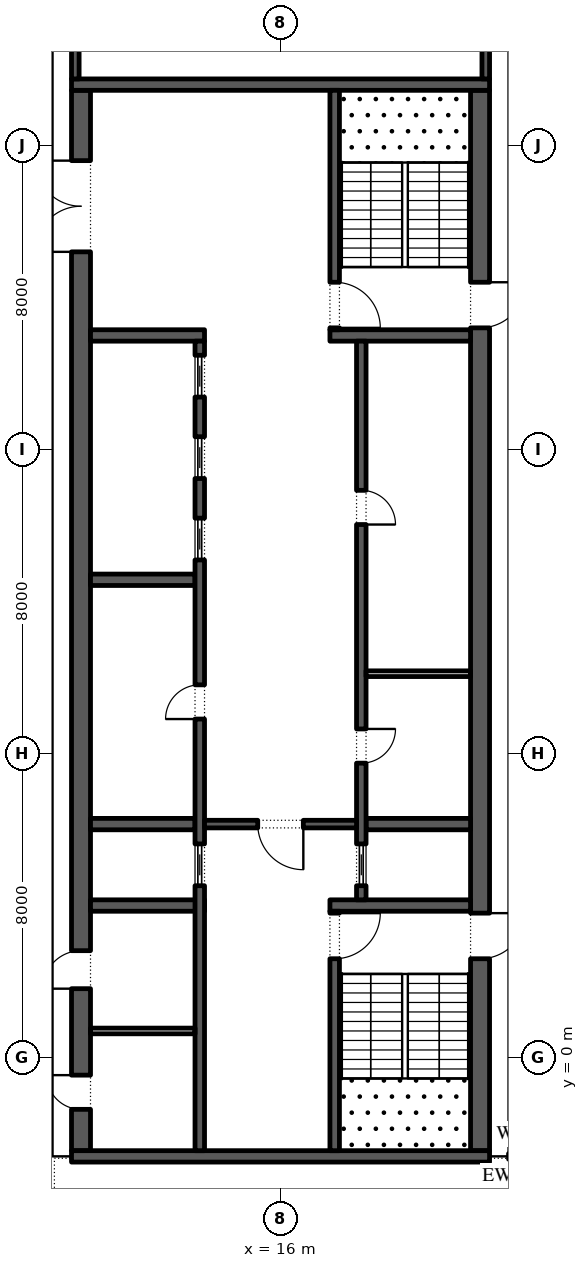
"""IFC4 building model, lengths in metres.
Left out: names, types, materials, properties, quantities, classifications, styles, units other than length and angle.
Written with IfcOpenShell. Run it as: python <this file> out.ifc"""

import sys

from ifc_helpers import new_model, si_unit, direction, frame, frame_2d, origin, place, context, subcontext, project, spatial, rectangle, extrude, element, fill, save


model = new_model("IFC4")
c1 = context("Model", 3, precision=1e-05, world=origin(), true_north=direction((0.0, 1.0)))
c2 = subcontext(c1, "Body", "Model", "MODEL_VIEW")
j1 = project(units=[si_unit("LENGTHUNIT", "METRE"), si_unit("PLANEANGLEUNIT", "RADIAN")], contexts=[c1])
p1 = place(None, origin())
s1 = spatial("IfcSite", under=j1, at=p1, CompositionType="ELEMENT")
p2 = place(p1, origin())
s2 = spatial("IfcBuilding", under=s1, at=p2, CompositionType="ELEMENT")
p3 = place(p2, frame((0.0, 0.0, 355.2)))
s3 = spatial("IfcBuildingStorey", under=s2, at=p3, CompositionType="ELEMENT", Elevation=355.2)
p4 = place(p3, frame((21.25, -2.45, 0.0), z_axis=(0.0, 0.0, 1.0), x_axis=(0.0, 1.0, 0.0)))
e1 = element("IfcWall", 1, at=p4, inside=s3, PredefinedType="SHEAR", context=c2, shape_type="SweptSolid", body=[
    extrude(rectangle(XDim=27.9, YDim=0.5, at=frame_2d((13.95, 0.0))), origin(), (0.0, 0.0, 1.0), 3.95),
])
p5 = place(p4, frame((5.05, 0.0, 0.0)))
e2 = element("IfcOpeningElement", 2, at=p5, cuts=e1, PredefinedType="OPENING", context=c2, shape_type="SweptSolid", body=[
    extrude(rectangle(XDim=1.2, YDim=2.1, at=frame_2d((0.6, 1.05))), frame((0.0, 0.26, 0.0), z_axis=(0.0, -1.0, 0.0), x_axis=(1.0, 0.0, 0.0)), (0.0, 0.0, 1.0), 0.52),
])
p6 = place(p4, frame((21.65, 0.0, 0.0)))
e3 = element("IfcOpeningElement", 3, at=p6, cuts=e1, PredefinedType="OPENING", context=c2, shape_type="SweptSolid", body=[
    extrude(rectangle(XDim=1.2, YDim=2.1, at=frame_2d((0.6, 1.05))), frame((0.0, 0.26, 0.0), z_axis=(0.0, -1.0, 0.0), x_axis=(1.0, 0.0, 0.0)), (0.0, 0.0, 1.0), 0.52),
])
p7 = place(p3, frame((10.75, -2.45, 0.0), z_axis=(0.0, 0.0, 1.0), x_axis=(0.0, 1.0, 0.0)))
e4 = element("IfcWall", 4, at=p7, inside=s3, PredefinedType="SHEAR", context=c2, shape_type="SweptSolid", body=[
    extrude(rectangle(XDim=27.9, YDim=0.5, at=frame_2d((13.95, 0.0))), origin(), (0.0, 0.0, 1.0), 3.95),
])
p8 = place(p7, frame((23.65, 0.0, 0.0)))
e5 = element("IfcOpeningElement", 5, at=p8, cuts=e4, PredefinedType="OPENING", context=c2, shape_type="SweptSolid", body=[
    extrude(rectangle(XDim=2.4, YDim=2.1, at=frame_2d((1.2, 1.05))), frame((0.0, 0.26, 0.0), z_axis=(0.0, -1.0, 0.0), x_axis=(1.0, 0.0, 0.0)), (0.0, 0.0, 1.0), 0.52),
])
p9 = place(p7, frame((1.087, 0.0, 0.0)))
e6 = element("IfcOpeningElement", 6, at=p9, cuts=e4, PredefinedType="OPENING", context=c2, shape_type="SweptSolid", body=[
    extrude(rectangle(XDim=0.9, YDim=2.1, at=frame_2d((0.45, 1.05))), frame((0.0, 0.26, 0.0), z_axis=(0.0, -1.0, 0.0), x_axis=(1.0, 0.0, 0.0)), (0.0, 0.0, 1.0), 0.52),
])
p10 = place(p7, frame((4.262, 0.0, 0.0)))
e7 = element("IfcOpeningElement", 7, at=p10, cuts=e4, PredefinedType="OPENING", context=c2, shape_type="SweptSolid", body=[
    extrude(rectangle(XDim=1.0, YDim=2.1, at=frame_2d((0.5, 1.05))), frame((0.0, 0.26, 0.0), z_axis=(0.0, -1.0, 0.0), x_axis=(1.0, 0.0, 0.0)), (0.0, 0.0, 1.0), 0.52),
])
for number, where, z_axis, x_axis in (
    (8, (10.5, -2.6, 0.0), (0.0, 0.0, 1.0), (1.0, 0.0, 0.0)),
    (9, (10.5, 25.6, 0.0), (0.0, 0.0, 1.0), (1.0, 0.0, 0.0)),
):
    element("IfcWall", number, at=place(p3, frame(where, z_axis=z_axis, x_axis=x_axis)), inside=s3, PredefinedType="SHEAR", context=c2, shape_type="SweptSolid", body=[
        extrude(rectangle(XDim=11.0, YDim=0.3, at=frame_2d((5.5, 0.0))), origin(), (0.0, 0.0, 1.0), 3.95),
    ])
p11 = place(p3, frame((17.3, 4.0, 0.0), z_axis=(0.0, 0.0, 1.0), x_axis=(1.0, 0.0, 0.0)))
e10 = element("IfcWall", 10, at=p11, inside=s3, PredefinedType="SHEAR", context=c2, shape_type="SweptSolid", body=[
    extrude(rectangle(XDim=3.7, YDim=0.3, at=frame_2d((1.85, 0.0))), origin(), (0.0, 0.0, 1.0), 3.95),
])
p12 = place(p3, frame((17.425, -2.45, 0.0), z_axis=(0.0, 0.0, 1.0), x_axis=(0.0, 1.0, 0.0)))
e11 = element("IfcWall", 11, at=p12, inside=s3, PredefinedType="SHEAR", context=c2, shape_type="SweptSolid", body=[
    extrude(rectangle(XDim=6.3, YDim=0.25, at=frame_2d((3.15, 0.0))), origin(), (0.0, 0.0, 1.0), 3.95),
])
p13 = place(p12, frame((5.05, 0.0, 0.0)))
e12 = element("IfcOpeningElement", 12, at=p13, cuts=e11, PredefinedType="OPENING", context=c2, shape_type="SweptSolid", body=[
    extrude(rectangle(XDim=1.2, YDim=2.1, at=frame_2d((0.6, 1.05))), frame((0.0, 0.135, 0.0), z_axis=(0.0, -1.0, 0.0), x_axis=(1.0, 0.0, 0.0)), (0.0, 0.0, 1.0), 0.27),
])
p14 = place(p3, frame((17.3, 19.0, 0.0), z_axis=(0.0, 0.0, 1.0), x_axis=(1.0, 0.0, 0.0)))
e13 = element("IfcWall", 13, at=p14, inside=s3, PredefinedType="SHEAR", context=c2, shape_type="SweptSolid", body=[
    extrude(rectangle(XDim=3.7, YDim=0.3, at=frame_2d((1.85, 0.0))), origin(), (0.0, 0.0, 1.0), 3.95),
])
p15 = place(p3, frame((17.425, 19.15, 0.0), z_axis=(0.0, 0.0, 1.0), x_axis=(0.0, 1.0, 0.0)))
e14 = element("IfcWall", 14, at=p15, inside=s3, PredefinedType="SHEAR", context=c2, shape_type="SweptSolid", body=[
    extrude(rectangle(XDim=6.3, YDim=0.25, at=frame_2d((3.15, 0.0))), origin(), (0.0, 0.0, 1.0), 3.95),
])
p16 = place(p15, frame((0.05, 0.0, 0.0)))
e15 = element("IfcOpeningElement", 15, at=p16, cuts=e14, PredefinedType="OPENING", context=c2, shape_type="SweptSolid", body=[
    extrude(rectangle(XDim=1.2, YDim=2.1, at=frame_2d((0.6, 1.05))), frame((0.0, 0.135, 0.0), z_axis=(0.0, -1.0, 0.0), x_axis=(1.0, 0.0, 0.0)), (0.0, 0.0, 1.0), 0.27),
])
p17 = place(p3, frame((18.25, 6.143, 0.0), z_axis=(0.0, 0.0, 1.0), x_axis=(1.0, 0.0, 0.0)))
e16 = element("IfcWall", 16, at=p17, inside=s3, PredefinedType="SHEAR", context=c2, shape_type="SweptSolid", body=[
    extrude(rectangle(XDim=2.75, YDim=0.3, at=frame_2d((1.375, 0.0))), origin(), (0.0, 0.0, 1.0), 3.95),
])
p18 = place(p3, frame((18.125, 4.15, 0.0), z_axis=(0.0, 0.0, 1.0), x_axis=(0.0, 1.0, 0.0)))
e17 = element("IfcWall", 17, at=p18, inside=s3, PredefinedType="SHEAR", context=c2, shape_type="SweptSolid", body=[
    extrude(rectangle(XDim=14.7, YDim=0.25, at=frame_2d((7.35, 0.0))), origin(), (0.0, 0.0, 1.0), 3.95),
])
p19 = place(p18, frame((3.596, 0.0, 0.0)))
e18 = element("IfcOpeningElement", 18, at=p19, cuts=e17, PredefinedType="OPENING", context=c2, shape_type="SweptSolid", body=[
    extrude(rectangle(XDim=0.9, YDim=2.1, at=frame_2d((0.45, 1.05))), frame((0.0, 0.135, 0.0), z_axis=(0.0, -1.0, 0.0), x_axis=(1.0, 0.0, 0.0)), (0.0, 0.0, 1.0), 0.27),
])
p20 = place(p18, frame((9.875, 0.0, 0.0)))
e19 = element("IfcOpeningElement", 19, at=p20, cuts=e17, PredefinedType="OPENING", context=c2, shape_type="SweptSolid", body=[
    extrude(rectangle(XDim=0.9, YDim=2.1, at=frame_2d((0.45, 1.05))), frame((0.0, 0.135, 0.0), z_axis=(0.0, -1.0, 0.0), x_axis=(1.0, 0.0, 0.0)), (0.0, 0.0, 1.0), 0.27),
])
p21 = place(p18, frame((0.371, 0.0, 0.0)))
e20 = element("IfcOpeningElement", 20, at=p21, cuts=e17, PredefinedType="OPENING", context=c2, shape_type="SweptSolid", body=[
    extrude(rectangle(XDim=1.1, YDim=2.1, at=frame_2d((0.55, 1.05))), frame((0.0, 0.135, 0.0), z_axis=(0.0, -1.0, 0.0), x_axis=(1.0, 0.0, 0.0)), (0.0, 0.0, 1.0), 0.27),
])
p22 = place(p3, frame((18.25, 10.1, 0.0), z_axis=(0.0, 0.0, 1.0), x_axis=(1.0, 0.0, 0.0)))
e21 = element("IfcWall", 21, at=p22, inside=s3, PredefinedType="PARTITIONING", context=c2, shape_type="SweptSolid", body=[
    extrude(rectangle(XDim=2.75, YDim=0.15, at=frame_2d((1.375, 0.0))), origin(), (0.0, 0.0, 1.0), 3.95),
])
p23 = place(p3, frame((11.0, 4.0, 0.0), z_axis=(0.0, 0.0, 1.0), x_axis=(1.0, 0.0, 0.0)))
e22 = element("IfcWall", 22, at=p23, inside=s3, PredefinedType="SHEAR", context=c2, shape_type="SweptSolid", body=[
    extrude(rectangle(XDim=3.0, YDim=0.3, at=frame_2d((1.5, 0.0))), origin(), (0.0, 0.0, 1.0), 3.95),
])
for number, where, z_axis, x_axis in (
    (23, (11.0, 6.143, 0.0), (0.0, 0.0, 1.0), (1.0, 0.0, 0.0)),
    (24, (11.0, 12.571, 0.0), (0.0, 0.0, 1.0), (1.0, 0.0, 0.0)),
):
    element("IfcWall", number, at=place(p3, frame(where, z_axis=z_axis, x_axis=x_axis)), inside=s3, PredefinedType="SHEAR", context=c2, shape_type="SweptSolid", body=[
        extrude(rectangle(XDim=2.75, YDim=0.3, at=frame_2d((1.375, 0.0))), origin(), (0.0, 0.0, 1.0), 3.95),
    ])
p24 = place(p3, frame((11.0, 19.0, 0.0), z_axis=(0.0, 0.0, 1.0), x_axis=(1.0, 0.0, 0.0)))
e25 = element("IfcWall", 25, at=p24, inside=s3, PredefinedType="SHEAR", context=c2, shape_type="SweptSolid", body=[
    extrude(rectangle(XDim=3.0, YDim=0.3, at=frame_2d((1.5, 0.0))), origin(), (0.0, 0.0, 1.0), 3.95),
])
p25 = place(p3, frame((13.875, -2.45, 0.0), z_axis=(0.0, 0.0, 1.0), x_axis=(0.0, 1.0, 0.0)))
e26 = element("IfcWall", 26, at=p25, inside=s3, PredefinedType="SHEAR", context=c2, shape_type="SweptSolid", body=[
    extrude(rectangle(XDim=21.3, YDim=0.25, at=frame_2d((10.65, 0.0))), origin(), (0.0, 0.0, 1.0), 3.95),
])
p26 = place(p25, frame((11.357, 0.0, 0.0)))
e27 = element("IfcOpeningElement", 27, at=p26, cuts=e26, PredefinedType="OPENING", context=c2, shape_type="SweptSolid", body=[
    extrude(rectangle(XDim=0.9, YDim=2.1, at=frame_2d((0.45, 1.05))), frame((0.0, 0.135, 0.0), z_axis=(0.0, -1.0, 0.0), x_axis=(1.0, 0.0, 0.0)), (0.0, 0.0, 1.0), 0.27),
])
p27 = place(p25, frame((6.971, 0.0, 0.0)))
e28 = element("IfcOpeningElement", 28, at=p27, cuts=e26, PredefinedType="OPENING", context=c2, shape_type="SweptSolid", body=[
    extrude(rectangle(XDim=1.1, YDim=2.1, at=frame_2d((0.55, 1.05))), frame((0.0, 0.135, 0.0), z_axis=(0.0, -1.0, 0.0), x_axis=(1.0, 0.0, 0.0)), (0.0, 0.0, 1.0), 0.27),
])
p28 = place(p25, frame((15.543, 0.0, 0.0)))
e29 = element("IfcOpeningElement", 29, at=p28, cuts=e26, PredefinedType="OPENING", context=c2, shape_type="SweptSolid", body=[
    extrude(rectangle(XDim=1.1, YDim=2.1, at=frame_2d((0.55, 1.05))), frame((0.0, 0.135, 0.0), z_axis=(0.0, -1.0, 0.0), x_axis=(1.0, 0.0, 0.0)), (0.0, 0.0, 1.0), 0.27),
])
p29 = place(p25, frame((17.686, 0.0, 0.0)))
e30 = element("IfcOpeningElement", 30, at=p29, cuts=e26, PredefinedType="OPENING", context=c2, shape_type="SweptSolid", body=[
    extrude(rectangle(XDim=1.1, YDim=2.1, at=frame_2d((0.55, 1.05))), frame((0.0, 0.135, 0.0), z_axis=(0.0, -1.0, 0.0), x_axis=(1.0, 0.0, 0.0)), (0.0, 0.0, 1.0), 0.27),
])
p30 = place(p25, frame((19.829, 0.0, 0.0)))
e31 = element("IfcOpeningElement", 31, at=p30, cuts=e26, PredefinedType="OPENING", context=c2, shape_type="SweptSolid", body=[
    extrude(rectangle(XDim=1.1, YDim=2.1, at=frame_2d((0.55, 1.05))), frame((0.0, 0.135, 0.0), z_axis=(0.0, -1.0, 0.0), x_axis=(1.0, 0.0, 0.0)), (0.0, 0.0, 1.0), 0.27),
])
p31 = place(p3, frame((14.0, 6.143, 0.0), z_axis=(0.0, 0.0, 1.0), x_axis=(1.0, 0.0, 0.0)))
e32 = element("IfcWall", 32, at=p31, inside=s3, PredefinedType="SHEAR", context=c2, shape_type="SweptSolid", body=[
    extrude(rectangle(XDim=4.0, YDim=0.2, at=frame_2d((2.0, 0.0))), origin(), (0.0, 0.0, 1.0), 3.95),
])
p32 = place(p31, frame((1.4, 0.0, 0.0)))
e33 = element("IfcOpeningElement", 33, at=p32, cuts=e32, PredefinedType="OPENING", context=c2, shape_type="SweptSolid", body=[
    extrude(rectangle(XDim=1.2, YDim=2.1, at=frame_2d((0.6, 1.05))), frame((0.0, 0.11, 0.0), z_axis=(0.0, -1.0, 0.0), x_axis=(1.0, 0.0, 0.0)), (0.0, 0.0, 1.0), 0.22),
])
p33 = place(p3, frame((11.0, 0.7, 0.0), z_axis=(0.0, 0.0, 1.0), x_axis=(1.0, 0.0, 0.0)))
e34 = element("IfcWall", 34, at=p33, inside=s3, PredefinedType="PARTITIONING", context=c2, shape_type="SweptSolid", body=[
    extrude(rectangle(XDim=2.75, YDim=0.15, at=frame_2d((1.375, 0.0))), origin(), (0.0, 0.0, 1.0), 3.95),
])
p34 = place(p3, frame((21.4, 25.75, 0.0), z_axis=(0.0, 0.0, 1.0), x_axis=(0.0, 1.0, 0.0)))
e35 = element("IfcWall", 35, at=p34, inside=s3, PredefinedType="SHEAR", context=c2, shape_type="SweptSolid", body=[
    extrude(rectangle(XDim=15.05, YDim=0.2, at=frame_2d((7.525, 0.0))), origin(), (0.0, 0.0, 1.0), 3.95),
])
p35 = place(p3, frame((10.6, 25.75, 0.0), z_axis=(0.0, 0.0, 1.0), x_axis=(0.0, 1.0, 0.0)))
e36 = element("IfcWall", 36, at=p35, inside=s3, PredefinedType="SHEAR", context=c2, shape_type="SweptSolid", body=[
    extrude(rectangle(XDim=15.05, YDim=0.2, at=frame_2d((7.525, 0.0))), origin(), (0.0, 0.0, 1.0), 3.95),
])
p36 = place(p35, frame((3.288, 0.0, 0.0)))
e37 = element("IfcOpeningElement", 37, at=p36, cuts=e36, PredefinedType="OPENING", context=c2, shape_type="SweptSolid", body=[
    extrude(rectangle(XDim=0.9, YDim=2.1, at=frame_2d((0.45, 1.05))), frame((0.0, 0.11, 0.0), z_axis=(0.0, -1.0, 0.0), x_axis=(1.0, 0.0, 0.0)), (0.0, 0.0, 1.0), 0.22),
])
p37 = place(p35, frame((10.887, 0.0, 0.0)))
e38 = element("IfcOpeningElement", 38, at=p37, cuts=e36, PredefinedType="OPENING", context=c2, shape_type="SweptSolid", body=[
    extrude(rectangle(XDim=0.9, YDim=2.1, at=frame_2d((0.45, 1.05))), frame((0.0, 0.11, 0.0), z_axis=(0.0, -1.0, 0.0), x_axis=(1.0, 0.0, 0.0)), (0.0, 0.0, 1.0), 0.22),
])
p38 = place(p19, frame((0.9, -0.2, 0.0), z_axis=(0.0, 0.0, 1.0), x_axis=(-1.0, 0.0, 0.0)))
e39 = element("IfcDoor", 39, at=p38, inside=s3, OperationType="SINGLE_SWING_RIGHT", PredefinedType="DOOR", context=c2, shape_type="SweptSolid", body=[
    extrude(rectangle(XDim=0.9, YDim=2.1, at=frame_2d((0.45, 1.05))), frame((0.0, -0.075, 0.0), z_axis=(0.0, -1.0, 0.0), x_axis=(1.0, 0.0, 0.0)), (0.0, 0.0, 1.0), 0.05),
])
fill(e18, e39)
p39 = place(p20, frame((0.9, -0.2, 0.0), z_axis=(0.0, 0.0, 1.0), x_axis=(-1.0, 0.0, 0.0)))
e40 = element("IfcDoor", 40, at=p39, inside=s3, OperationType="SINGLE_SWING_LEFT", PredefinedType="DOOR", context=c2, shape_type="SweptSolid", body=[
    extrude(rectangle(XDim=0.9, YDim=2.1, at=frame_2d((0.45, 1.05))), frame((0.0, -0.075, 0.0), z_axis=(0.0, -1.0, 0.0), x_axis=(1.0, 0.0, 0.0)), (0.0, 0.0, 1.0), 0.05),
])
fill(e19, e40)
p40 = place(p21, origin())
e41 = element("IfcDoor", 41, at=p40, inside=s3, OperationType="SLIDING_TO_LEFT", PredefinedType="DOOR", context=c2, shape_type="SweptSolid", body=[
    extrude(rectangle(XDim=1.1, YDim=2.1, at=frame_2d((0.55, 1.05))), frame((0.0, 0.025, 0.0), z_axis=(0.0, -1.0, 0.0), x_axis=(1.0, 0.0, 0.0)), (0.0, 0.0, 1.0), 0.05),
])
fill(e20, e41)
p41 = place(p26, origin())
e42 = element("IfcDoor", 42, at=p41, inside=s3, OperationType="SINGLE_SWING_RIGHT", PredefinedType="DOOR", context=c2, shape_type="SweptSolid", body=[
    extrude(rectangle(XDim=0.9, YDim=2.1, at=frame_2d((0.45, 1.05))), frame((0.0, 0.125, 0.0), z_axis=(0.0, -1.0, 0.0), x_axis=(1.0, 0.0, 0.0)), (0.0, 0.0, 1.0), 0.05),
])
fill(e27, e42)
p42 = place(p27, origin())
e43 = element("IfcDoor", 43, at=p42, inside=s3, OperationType="SLIDING_TO_LEFT", PredefinedType="DOOR", context=c2, shape_type="SweptSolid", body=[
    extrude(rectangle(XDim=1.1, YDim=2.1, at=frame_2d((0.55, 1.05))), frame((0.0, 0.025, 0.0), z_axis=(0.0, -1.0, 0.0), x_axis=(1.0, 0.0, 0.0)), (0.0, 0.0, 1.0), 0.05),
])
fill(e28, e43)
p43 = place(p28, origin())
e44 = element("IfcDoor", 44, at=p43, inside=s3, OperationType="SLIDING_TO_LEFT", PredefinedType="DOOR", context=c2, shape_type="SweptSolid", body=[
    extrude(rectangle(XDim=1.1, YDim=2.1, at=frame_2d((0.55, 1.05))), frame((0.0, 0.025, 0.0), z_axis=(0.0, -1.0, 0.0), x_axis=(1.0, 0.0, 0.0)), (0.0, 0.0, 1.0), 0.05),
])
fill(e29, e44)
p44 = place(p29, origin())
e45 = element("IfcDoor", 45, at=p44, inside=s3, OperationType="SLIDING_TO_LEFT", PredefinedType="DOOR", context=c2, shape_type="SweptSolid", body=[
    extrude(rectangle(XDim=1.1, YDim=2.1, at=frame_2d((0.55, 1.05))), frame((0.0, 0.025, 0.0), z_axis=(0.0, -1.0, 0.0), x_axis=(1.0, 0.0, 0.0)), (0.0, 0.0, 1.0), 0.05),
])
fill(e30, e45)
p45 = place(p30, origin())
e46 = element("IfcDoor", 46, at=p45, inside=s3, OperationType="SLIDING_TO_LEFT", PredefinedType="DOOR", context=c2, shape_type="SweptSolid", body=[
    extrude(rectangle(XDim=1.1, YDim=2.1, at=frame_2d((0.55, 1.05))), frame((0.0, 0.025, 0.0), z_axis=(0.0, -1.0, 0.0), x_axis=(1.0, 0.0, 0.0)), (0.0, 0.0, 1.0), 0.05),
])
fill(e31, e46)
p46 = place(p32, frame((1.2, 0.0, 0.0), z_axis=(0.0, 0.0, 1.0), x_axis=(-1.0, 0.0, 0.0)))
e47 = element("IfcDoor", 47, at=p46, inside=s3, OperationType="SINGLE_SWING_RIGHT", PredefinedType="DOOR", context=c2, shape_type="SweptSolid", body=[
    extrude(rectangle(XDim=1.2, YDim=2.1, at=frame_2d((0.6, 1.05))), frame((0.0, 0.025, 0.0), z_axis=(0.0, -1.0, 0.0), x_axis=(1.0, 0.0, 0.0)), (0.0, 0.0, 1.0), 0.05),
])
fill(e33, e47)
p47 = place(p8, origin())
e48 = element("IfcDoor", 48, at=p47, inside=s3, OperationType="DOUBLE_DOOR_SINGLE_SWING", PredefinedType="DOOR", context=c2, shape_type="SweptSolid", body=[
    extrude(rectangle(XDim=2.4, YDim=2.1, at=frame_2d((1.2, 1.05))), frame((0.0, 0.025, 0.0), z_axis=(0.0, -1.0, 0.0), x_axis=(1.0, 0.0, 0.0)), (0.0, 0.0, 1.0), 0.05),
])
fill(e5, e48)
p48 = place(p13, frame((1.2, 0.0, 0.0), z_axis=(0.0, 0.0, 1.0), x_axis=(-1.0, 0.0, 0.0)))
e49 = element("IfcDoor", 49, at=p48, inside=s3, OperationType="SINGLE_SWING_RIGHT", PredefinedType="DOOR", context=c2, shape_type="SweptSolid", body=[
    extrude(rectangle(XDim=1.2, YDim=2.1, at=frame_2d((0.6, 1.05))), frame((0.0, 0.025, 0.0), z_axis=(0.0, -1.0, 0.0), x_axis=(1.0, 0.0, 0.0)), (0.0, 0.0, 1.0), 0.05),
])
fill(e12, e49)
p49 = place(p5, frame((1.2, 0.0, 0.0), z_axis=(0.0, 0.0, 1.0), x_axis=(-1.0, 0.0, 0.0)))
e50 = element("IfcDoor", 50, at=p49, inside=s3, OperationType="SINGLE_SWING_RIGHT", PredefinedType="DOOR", context=c2, shape_type="SweptSolid", body=[
    extrude(rectangle(XDim=1.2, YDim=2.1, at=frame_2d((0.6, 1.05))), frame((0.0, 0.025, 0.0), z_axis=(0.0, -1.0, 0.0), x_axis=(1.0, 0.0, 0.0)), (0.0, 0.0, 1.0), 0.05),
])
fill(e2, e50)
p50 = place(p16, frame((1.2, 0.0, 0.0), z_axis=(0.0, 0.0, 1.0), x_axis=(-1.0, 0.0, 0.0)))
e51 = element("IfcDoor", 51, at=p50, inside=s3, OperationType="SINGLE_SWING_LEFT", PredefinedType="DOOR", context=c2, shape_type="SweptSolid", body=[
    extrude(rectangle(XDim=1.2, YDim=2.1, at=frame_2d((0.6, 1.05))), frame((0.0, 0.025, 0.0), z_axis=(0.0, -1.0, 0.0), x_axis=(1.0, 0.0, 0.0)), (0.0, 0.0, 1.0), 0.05),
])
fill(e15, e51)
p51 = place(p6, frame((1.2, 0.0, 0.0), z_axis=(0.0, 0.0, 1.0), x_axis=(-1.0, 0.0, 0.0)))
e52 = element("IfcDoor", 52, at=p51, inside=s3, OperationType="SINGLE_SWING_RIGHT", PredefinedType="DOOR", context=c2, shape_type="SweptSolid", body=[
    extrude(rectangle(XDim=1.2, YDim=2.1, at=frame_2d((0.6, 1.05))), frame((0.0, 0.025, 0.0), z_axis=(0.0, -1.0, 0.0), x_axis=(1.0, 0.0, 0.0)), (0.0, 0.0, 1.0), 0.05),
])
fill(e3, e52)
p52 = place(p9, origin())
e53 = element("IfcDoor", 53, at=p52, inside=s3, OperationType="SINGLE_SWING_LEFT", PredefinedType="DOOR", context=c2, shape_type="SweptSolid", body=[
    extrude(rectangle(XDim=0.9, YDim=2.1, at=frame_2d((0.45, 1.05))), frame((0.0, -0.2, 0.0), z_axis=(0.0, -1.0, 0.0), x_axis=(1.0, 0.0, 0.0)), (0.0, 0.0, 1.0), 0.05),
])
fill(e6, e53)
p53 = place(p10, origin())
e54 = element("IfcDoor", 54, at=p53, inside=s3, OperationType="SINGLE_SWING_RIGHT", PredefinedType="DOOR", context=c2, shape_type="SweptSolid", body=[
    extrude(rectangle(XDim=1.0, YDim=2.1, at=frame_2d((0.5, 1.05))), frame((0.0, -0.2, 0.0), z_axis=(0.0, -1.0, 0.0), x_axis=(1.0, 0.0, 0.0)), (0.0, 0.0, 1.0), 0.05),
])
fill(e7, e54)
save(model, sys.argv[1])
